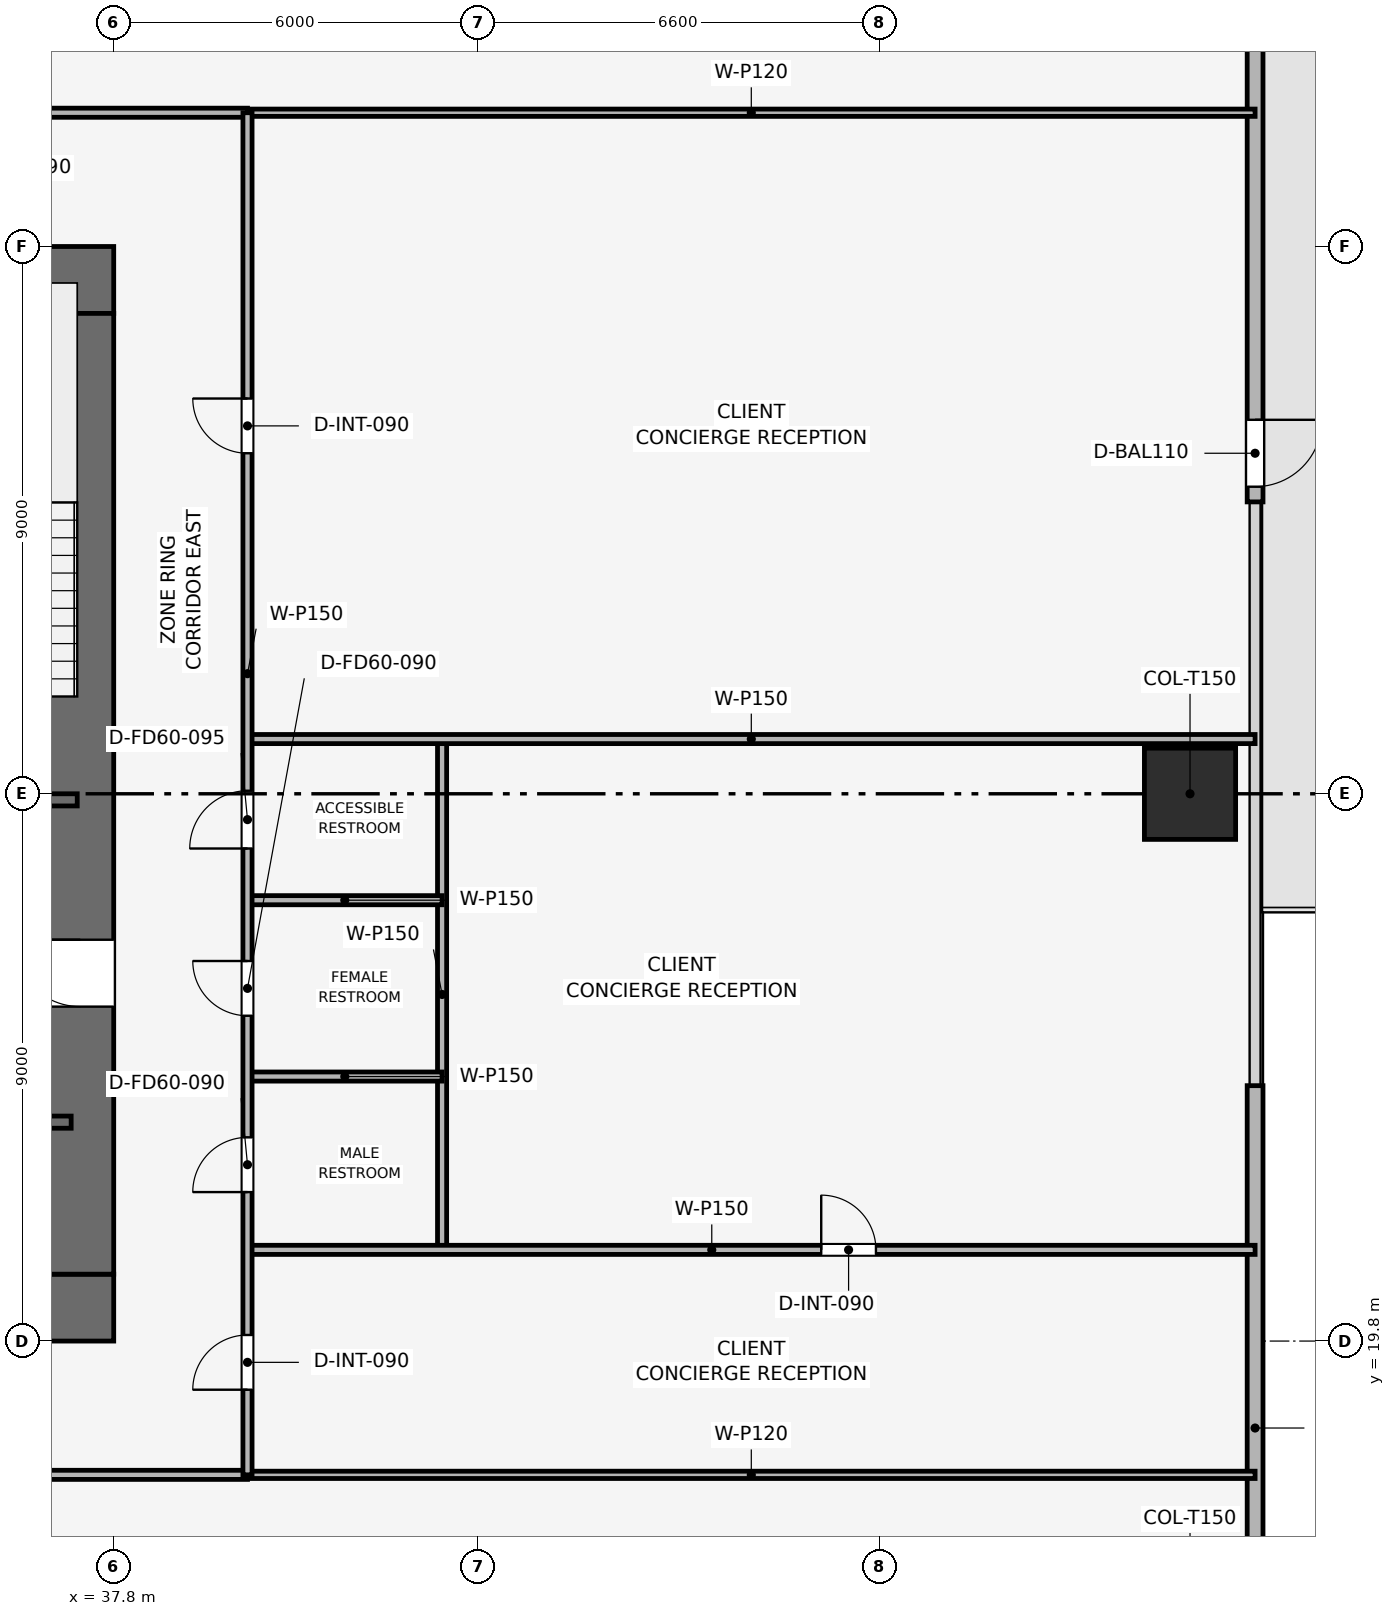
"""IFC4 building model, lengths in metres.
Left out: names, types, materials, properties, quantities, classifications, styles, units other than length and angle.
Written with IfcOpenShell. Run it as: python <this file> out.ifc"""

import sys

from ifc_helpers import new_model, si_unit, direction, frame, frame_2d, origin, origin_2d, place, context, subcontext, project, spatial, rectangle, extrude, element, fill, save


model = new_model("IFC4")
c1 = context("Model", 3, precision=1e-05, world=origin(), true_north=direction((0.0, 1.0)))
c2 = subcontext(c1, "Body", "Model", "MODEL_VIEW")
j1 = project(units=[si_unit("LENGTHUNIT", "METRE"), si_unit("PLANEANGLEUNIT", "RADIAN")], contexts=[c1])
p1 = place(None, origin())
s1 = spatial("IfcSite", under=j1, at=p1, CompositionType="ELEMENT")
p2 = place(p1, origin())
s2 = spatial("IfcBuilding", under=s1, at=p2, CompositionType="ELEMENT")
p3 = place(p2, frame((0.0, 0.0, 45.6)))
s3 = spatial("IfcBuildingStorey", under=s2, at=p3, CompositionType="ELEMENT", Elevation=45.6)
p4 = place(p3, frame((19.8, 20.35, 0.0), z_axis=(0.0, 0.0, 1.0), x_axis=(1.0, 0.0, 0.0)))
e1 = element("IfcWall", 1, at=p4, inside=s3, PredefinedType="SHEAR", context=c2, shape_type="SweptSolid", body=[
    extrude(rectangle(XDim=18.0, YDim=1.1, at=frame_2d((9.0, 0.0))), origin(), (0.0, 0.0, 1.0), 3.9),
])
p5 = place(p4, frame((8.4, 0.0, 0.0)))
e2 = element("IfcOpeningElement", 2, at=p5, cuts=e1, PredefinedType="OPENING", context=c2, shape_type="SweptSolid", body=[
    extrude(rectangle(XDim=1.2, YDim=2.2, at=frame_2d((0.6, 1.1))), frame((0.0, 0.56, 0.0), z_axis=(0.0, -1.0, 0.0), x_axis=(1.0, 0.0, 0.0)), (0.0, 0.0, 1.0), 1.12),
])
p6 = place(p3, frame((19.8, 37.25, 0.0), z_axis=(0.0, 0.0, 1.0), x_axis=(1.0, 0.0, 0.0)))
e3 = element("IfcWall", 3, at=p6, inside=s3, PredefinedType="SHEAR", context=c2, shape_type="SweptSolid", body=[
    extrude(rectangle(XDim=18.0, YDim=1.1, at=frame_2d((9.0, 0.0))), origin(), (0.0, 0.0, 1.0), 3.9),
])
p7 = place(p6, frame((7.05, 0.0, 0.0)))
e4 = element("IfcOpeningElement", 4, at=p7, cuts=e3, PredefinedType="OPENING", context=c2, shape_type="SweptSolid", body=[
    extrude(rectangle(XDim=1.1, YDim=2.15, at=frame_2d((0.55, 1.075))), frame((0.0, 0.56, 0.0), z_axis=(0.0, -1.0, 0.0), x_axis=(1.0, 0.0, 0.0)), (0.0, 0.0, 1.0), 1.12),
])
p8 = place(p3, frame((37.25, 20.9, 0.0), z_axis=(0.0, 0.0, 1.0), x_axis=(0.0, 1.0, 0.0)))
e5 = element("IfcWall", 5, at=p8, inside=s3, PredefinedType="SHEAR", context=c2, shape_type="SweptSolid", body=[
    extrude(rectangle(XDim=15.8, YDim=1.1, at=frame_2d((7.9, 0.0))), origin(), (0.0, 0.0, 1.0), 3.9),
])
p9 = place(p8, frame((4.4, 0.0, 0.0)))
e6 = element("IfcOpeningElement", 6, at=p9, cuts=e5, PredefinedType="OPENING", context=c2, shape_type="SweptSolid", body=[
    extrude(rectangle(XDim=1.1, YDim=2.15, at=frame_2d((0.55, 1.075))), frame((0.0, 0.56, 0.0), z_axis=(0.0, -1.0, 0.0), x_axis=(1.0, 0.0, 0.0)), (0.0, 0.0, 1.0), 1.12),
])
p10 = place(p3, frame((55.5, 28.8, 0.003), z_axis=(0.0, 0.0, 1.0), x_axis=(1.0, 0.0, 0.0)))
e7 = element("IfcColumn", 7, at=p10, inside=s3, PredefinedType="COLUMN", context=c2, shape_type="SweptSolid", body=[
    extrude(rectangle(XDim=1.5, YDim=1.5, at=origin_2d()), origin(), (0.0, 0.0, 1.0), 3.644),
])
p11 = place(p3, frame((56.57, 48.9, 0.0), z_axis=(0.0, 0.0, 1.0), x_axis=(0.0, -1.0, 0.0)))
e8 = element("IfcWall", 8, at=p11, inside=s3, PredefinedType="SOLIDWALL", context=c2, shape_type="SweptSolid", body=[
    extrude(rectangle(XDim=15.3, YDim=0.26, at=frame_2d((7.65, 0.0))), origin(), (0.0, 0.0, 1.0), 3.65),
])
p12 = place(p11, frame((13.95, 0.0, 0.0)))
e9 = element("IfcOpeningElement", 9, at=p12, cuts=e8, PredefinedType="OPENING", context=c2, shape_type="SweptSolid", body=[
    extrude(rectangle(XDim=1.1, YDim=2.2, at=frame_2d((0.55, 1.1))), frame((0.0, 0.14, 0.0), z_axis=(0.0, -1.0, 0.0), x_axis=(1.0, 0.0, 0.0)), (0.0, 0.0, 1.0), 0.28),
])
p13 = place(p3, frame((56.57, 24.0, 0.0), z_axis=(0.0, 0.0, 1.0), x_axis=(0.0, -1.0, 0.0)))
e10 = element("IfcWall", 10, at=p13, inside=s3, PredefinedType="SOLIDWALL", context=c2, shape_type="SweptSolid", body=[
    extrude(rectangle(XDim=15.3, YDim=0.26, at=frame_2d((7.65, 0.0))), origin(), (0.0, 0.0, 1.0), 3.65),
])
p14 = place(p13, frame((11.25, 0.0, 0.9)))
e11 = element("IfcOpeningElement", 11, at=p14, cuts=e10, PredefinedType="OPENING", context=c2, shape_type="SweptSolid", body=[
    extrude(rectangle(XDim=3.8, YDim=1.9, at=frame_2d((1.9, 0.95))), frame((0.0, 0.14, 0.0), z_axis=(0.0, -1.0, 0.0), x_axis=(1.0, 0.0, 0.0)), (0.0, 0.0, 1.0), 0.28),
])
p15 = place(p3, frame((34.05, 28.7, 0.0), z_axis=(0.0, 0.0, 1.0), x_axis=(1.0, 0.0, 0.0)))
e12 = element("IfcWall", 12, at=p15, inside=s3, PredefinedType="SHEAR", context=c2, shape_type="SweptSolid", body=[
    extrude(rectangle(XDim=3.15, YDim=0.2, at=frame_2d((1.575, 0.0))), origin(), (0.0, 0.0, 1.0), 3.65),
])
p16 = place(p15, frame((0.8, 0.0, 0.0)))
e13 = element("IfcOpeningElement", 13, at=p16, cuts=e12, PredefinedType="OPENING", context=c2, shape_type="SweptSolid", body=[
    extrude(rectangle(XDim=1.0, YDim=2.1, at=frame_2d((0.5, 1.05))), frame((0.0, 0.11, 0.0), z_axis=(0.0, -1.0, 0.0), x_axis=(1.0, 0.0, 0.0)), (0.0, 0.0, 1.0), 0.22),
])
p17 = place(p3, frame((34.05, 23.4, 0.0), z_axis=(0.0, 0.0, 1.0), x_axis=(1.0, 0.0, 0.0)))
e14 = element("IfcWall", 14, at=p17, inside=s3, PredefinedType="SHEAR", context=c2, shape_type="SweptSolid", body=[
    extrude(rectangle(XDim=3.05, YDim=0.2, at=frame_2d((1.525, 0.0))), origin(), (0.0, 0.0, 1.0), 3.65),
])
p18 = place(p17, frame((1.2, 0.0, 0.0)))
e15 = element("IfcOpeningElement", 15, at=p18, cuts=e14, PredefinedType="OPENING", context=c2, shape_type="SweptSolid", body=[
    extrude(rectangle(XDim=1.1, YDim=2.15, at=frame_2d((0.55, 1.075))), frame((0.0, 0.11, 0.0), z_axis=(0.0, -1.0, 0.0), x_axis=(1.0, 0.0, 0.0)), (0.0, 0.0, 1.0), 0.22),
])
for number, where, z_axis, x_axis in (
    (16, (40.0, 17.6, 0.0), (0.0, 0.0, 1.0), (1.0, 0.0, 0.0)),
    (17, (40.0, 40.0, 0.0), (0.0, 0.0, 1.0), (1.0, 0.0, 0.0)),
):
    element("IfcWall", number, at=place(p3, frame(where, z_axis=z_axis, x_axis=x_axis)), inside=s3, PredefinedType="PARTITIONING", context=c2, shape_type="SweptSolid", body=[
        extrude(rectangle(XDim=16.57, YDim=0.12, at=frame_2d((8.285, 0.0))), origin(), (0.0, 0.0, 1.0), 2.935),
    ])
p19 = place(p3, frame((43.2, 21.3, 0.0), z_axis=(0.0, 0.0, 1.0), x_axis=(0.0, 1.0, 0.0)))
e18 = element("IfcWall", 18, at=p19, inside=s3, PredefinedType="PARTITIONING", context=c2, shape_type="SweptSolid", body=[
    extrude(rectangle(XDim=8.4, YDim=0.15, at=frame_2d((4.2, 0.0))), origin(), (0.0, 0.0, 1.0), 3.085),
])
p20 = place(p3, frame((40.0, 21.3, 0.0), z_axis=(0.0, 0.0, 1.0), x_axis=(1.0, 0.0, 0.0)))
e19 = element("IfcWall", 19, at=p20, inside=s3, PredefinedType="PARTITIONING", context=c2, shape_type="SweptSolid", body=[
    extrude(rectangle(XDim=16.57, YDim=0.15, at=frame_2d((8.285, 0.0))), origin(), (0.0, 0.0, 1.0), 2.935),
])
p21 = place(p20, frame((9.435, 0.0, 0.0)))
e20 = element("IfcOpeningElement", 20, at=p21, cuts=e19, PredefinedType="OPENING", context=c2, shape_type="SweptSolid", body=[
    extrude(rectangle(XDim=0.9, YDim=2.1, at=frame_2d((0.45, 1.05))), frame((0.0, 0.085, 0.0), z_axis=(0.0, -1.0, 0.0), x_axis=(1.0, 0.0, 0.0)), (0.0, 0.0, 1.0), 0.17),
])
p22 = place(p3, frame((40.0, 29.7, 0.0), z_axis=(0.0, 0.0, 1.0), x_axis=(1.0, 0.0, 0.0)))
e21 = element("IfcWall", 21, at=p22, inside=s3, PredefinedType="PARTITIONING", context=c2, shape_type="SweptSolid", body=[
    extrude(rectangle(XDim=16.57, YDim=0.15, at=frame_2d((8.285, 0.0))), origin(), (0.0, 0.0, 1.0), 2.935),
])
for number, where, z_axis, x_axis in (
    (22, (40.0, 24.15, 0.0), (0.0, 0.0, 1.0), (1.0, 0.0, 0.0)),
    (23, (40.0, 27.05, 0.0), (0.0, 0.0, 1.0), (1.0, 0.0, 0.0)),
):
    element("IfcWall", number, at=place(p3, frame(where, z_axis=z_axis, x_axis=x_axis)), inside=s3, PredefinedType="PARTITIONING", context=c2, shape_type="SweptSolid", body=[
        extrude(rectangle(XDim=3.2, YDim=0.15, at=frame_2d((1.6, 0.0))), origin(), (0.0, 0.0, 1.0), 3.65),
    ])
p23 = place(p3, frame((17.6, 17.6, 0.0), z_axis=(0.0, 0.0, 1.0), x_axis=(1.0, 0.0, 0.0)))
e24 = element("IfcWall", 24, at=p23, inside=s3, PredefinedType="PARTITIONING", context=c2, shape_type="SweptSolid", body=[
    extrude(rectangle(XDim=22.4, YDim=0.15, at=frame_2d((11.2, 0.0))), origin(), (0.0, 0.0, 1.0), 3.085),
])
p24 = place(p23, frame((10.75, 0.0, 0.0)))
e25 = element("IfcOpeningElement", 25, at=p24, cuts=e24, PredefinedType="OPENING", context=c2, shape_type="SweptSolid", body=[
    extrude(rectangle(XDim=0.9, YDim=2.1, at=frame_2d((0.45, 1.05))), frame((0.0, 0.085, 0.0), z_axis=(0.0, -1.0, 0.0), x_axis=(1.0, 0.0, 0.0)), (0.0, 0.0, 1.0), 0.17),
])
p25 = place(p3, frame((17.6, 40.0, 0.0), z_axis=(0.0, 0.0, 1.0), x_axis=(1.0, 0.0, 0.0)))
e26 = element("IfcWall", 26, at=p25, inside=s3, PredefinedType="PARTITIONING", context=c2, shape_type="SweptSolid", body=[
    extrude(rectangle(XDim=22.4, YDim=0.15, at=frame_2d((11.2, 0.0))), origin(), (0.0, 0.0, 1.0), 3.085),
])
p26 = place(p25, frame((0.7, 0.0, 0.0)))
e27 = element("IfcOpeningElement", 27, at=p26, cuts=e26, PredefinedType="OPENING", context=c2, shape_type="SweptSolid", body=[
    extrude(rectangle(XDim=0.9, YDim=2.1, at=frame_2d((0.45, 1.05))), frame((0.0, 0.085, 0.0), z_axis=(0.0, -1.0, 0.0), x_axis=(1.0, 0.0, 0.0)), (0.0, 0.0, 1.0), 0.17),
])
p27 = place(p25, frame((4.706, 0.0, 0.0)))
e28 = element("IfcOpeningElement", 28, at=p27, cuts=e26, PredefinedType="OPENING", context=c2, shape_type="SweptSolid", body=[
    extrude(rectangle(XDim=0.9, YDim=2.1, at=frame_2d((0.45, 1.05))), frame((0.0, 0.085, 0.0), z_axis=(0.0, -1.0, 0.0), x_axis=(1.0, 0.0, 0.0)), (0.0, 0.0, 1.0), 0.17),
])
p28 = place(p25, frame((10.704, 0.0, 0.0)))
e29 = element("IfcOpeningElement", 29, at=p28, cuts=e26, PredefinedType="OPENING", context=c2, shape_type="SweptSolid", body=[
    extrude(rectangle(XDim=0.9, YDim=2.1, at=frame_2d((0.45, 1.05))), frame((0.0, 0.085, 0.0), z_axis=(0.0, -1.0, 0.0), x_axis=(1.0, 0.0, 0.0)), (0.0, 0.0, 1.0), 0.17),
])
p29 = place(p25, frame((17.898, 0.0, 0.0)))
e30 = element("IfcOpeningElement", 30, at=p29, cuts=e26, PredefinedType="OPENING", context=c2, shape_type="SweptSolid", body=[
    extrude(rectangle(XDim=0.9, YDim=2.1, at=frame_2d((0.45, 1.05))), frame((0.0, 0.085, 0.0), z_axis=(0.0, -1.0, 0.0), x_axis=(1.0, 0.0, 0.0)), (0.0, 0.0, 1.0), 0.17),
])
p30 = place(p3, frame((40.0, 17.6, 0.0), z_axis=(0.0, 0.0, 1.0), x_axis=(0.0, 1.0, 0.0)))
e31 = element("IfcWall", 31, at=p30, inside=s3, PredefinedType="PARTITIONING", context=c2, shape_type="SweptSolid", body=[
    extrude(rectangle(XDim=22.4, YDim=0.15, at=frame_2d((11.2, 0.0))), origin(), (0.0, 0.0, 1.0), 3.085),
])
p31 = place(p30, frame((1.4, 0.0, 0.0)))
e32 = element("IfcOpeningElement", 32, at=p31, cuts=e31, PredefinedType="OPENING", context=c2, shape_type="SweptSolid", body=[
    extrude(rectangle(XDim=0.9, YDim=2.1, at=frame_2d((0.45, 1.05))), frame((0.0, 0.085, 0.0), z_axis=(0.0, -1.0, 0.0), x_axis=(1.0, 0.0, 0.0)), (0.0, 0.0, 1.0), 0.17),
])
p32 = place(p30, frame((4.65, 0.0, 0.0)))
e33 = element("IfcOpeningElement", 33, at=p32, cuts=e31, PredefinedType="OPENING", context=c2, shape_type="SweptSolid", body=[
    extrude(rectangle(XDim=0.9, YDim=2.1, at=frame_2d((0.45, 1.05))), frame((0.0, 0.085, 0.0), z_axis=(0.0, -1.0, 0.0), x_axis=(1.0, 0.0, 0.0)), (0.0, 0.0, 1.0), 0.17),
])
p33 = place(p30, frame((7.55, 0.0, 0.0)))
e34 = element("IfcOpeningElement", 34, at=p33, cuts=e31, PredefinedType="OPENING", context=c2, shape_type="SweptSolid", body=[
    extrude(rectangle(XDim=0.9, YDim=2.1, at=frame_2d((0.45, 1.05))), frame((0.0, 0.085, 0.0), z_axis=(0.0, -1.0, 0.0), x_axis=(1.0, 0.0, 0.0)), (0.0, 0.0, 1.0), 0.17),
])
p34 = place(p30, frame((10.3, 0.0, 0.0)))
e35 = element("IfcOpeningElement", 35, at=p34, cuts=e31, PredefinedType="OPENING", context=c2, shape_type="SweptSolid", body=[
    extrude(rectangle(XDim=0.95, YDim=2.1, at=frame_2d((0.475, 1.05))), frame((0.0, 0.085, 0.0), z_axis=(0.0, -1.0, 0.0), x_axis=(1.0, 0.0, 0.0)), (0.0, 0.0, 1.0), 0.17),
])
p35 = place(p30, frame((16.8, 0.0, 0.0)))
e36 = element("IfcOpeningElement", 36, at=p35, cuts=e31, PredefinedType="OPENING", context=c2, shape_type="SweptSolid", body=[
    extrude(rectangle(XDim=0.9, YDim=2.1, at=frame_2d((0.45, 1.05))), frame((0.0, 0.085, 0.0), z_axis=(0.0, -1.0, 0.0), x_axis=(1.0, 0.0, 0.0)), (0.0, 0.0, 1.0), 0.17),
])
p36 = place(p12, origin())
e37 = element("IfcDoor", 37, at=p36, inside=s3, OperationType="SINGLE_SWING_LEFT", PredefinedType="DOOR", context=c2, shape_type="SweptSolid", body=[
    extrude(rectangle(XDim=1.1, YDim=2.2, at=frame_2d((0.55, 1.1))), frame((0.0, 0.025, 0.0), z_axis=(0.0, -1.0, 0.0), x_axis=(1.0, 0.0, 0.0)), (0.0, 0.0, 1.0), 0.05),
])
fill(e9, e37)
p37 = place(p21, origin())
e38 = element("IfcDoor", 38, at=p37, inside=s3, OperationType="SINGLE_SWING_LEFT", PredefinedType="DOOR", context=c2, shape_type="SweptSolid", body=[
    extrude(rectangle(XDim=0.9, YDim=2.1, at=frame_2d((0.45, 1.05))), frame((0.0, 0.025, 0.0), z_axis=(0.0, -1.0, 0.0), x_axis=(1.0, 0.0, 0.0)), (0.0, 0.0, 1.0), 0.05),
])
fill(e20, e38)
p38 = place(p31, origin())
e39 = element("IfcDoor", 39, at=p38, inside=s3, OperationType="SINGLE_SWING_LEFT", PredefinedType="DOOR", context=c2, shape_type="SweptSolid", body=[
    extrude(rectangle(XDim=0.9, YDim=2.1, at=frame_2d((0.45, 1.05))), frame((0.0, 0.025, 0.0), z_axis=(0.0, -1.0, 0.0), x_axis=(1.0, 0.0, 0.0)), (0.0, 0.0, 1.0), 0.05),
])
fill(e32, e39)
p39 = place(p32, origin())
e40 = element("IfcDoor", 40, at=p39, inside=s3, OperationType="SINGLE_SWING_LEFT", PredefinedType="DOOR", context=c2, shape_type="SweptSolid", body=[
    extrude(rectangle(XDim=0.9, YDim=2.1, at=frame_2d((0.45, 1.05))), frame((0.0, 0.025, 0.0), z_axis=(0.0, -1.0, 0.0), x_axis=(1.0, 0.0, 0.0)), (0.0, 0.0, 1.0), 0.05),
])
fill(e33, e40)
p40 = place(p33, origin())
e41 = element("IfcDoor", 41, at=p40, inside=s3, OperationType="SINGLE_SWING_RIGHT", PredefinedType="DOOR", context=c2, shape_type="SweptSolid", body=[
    extrude(rectangle(XDim=0.9, YDim=2.1, at=frame_2d((0.45, 1.05))), frame((0.0, 0.025, 0.0), z_axis=(0.0, -1.0, 0.0), x_axis=(1.0, 0.0, 0.0)), (0.0, 0.0, 1.0), 0.05),
])
fill(e34, e41)
p41 = place(p34, origin())
e42 = element("IfcDoor", 42, at=p41, inside=s3, OperationType="SINGLE_SWING_LEFT", PredefinedType="DOOR", context=c2, shape_type="SweptSolid", body=[
    extrude(rectangle(XDim=0.95, YDim=2.1, at=frame_2d((0.475, 1.05))), frame((0.0, 0.025, 0.0), z_axis=(0.0, -1.0, 0.0), x_axis=(1.0, 0.0, 0.0)), (0.0, 0.0, 1.0), 0.05),
])
fill(e35, e42)
p42 = place(p35, origin())
e43 = element("IfcDoor", 43, at=p42, inside=s3, OperationType="SINGLE_SWING_RIGHT", PredefinedType="DOOR", context=c2, shape_type="SweptSolid", body=[
    extrude(rectangle(XDim=0.9, YDim=2.1, at=frame_2d((0.45, 1.05))), frame((0.0, 0.025, 0.0), z_axis=(0.0, -1.0, 0.0), x_axis=(1.0, 0.0, 0.0)), (0.0, 0.0, 1.0), 0.05),
])
fill(e36, e43)
p43 = place(p9, origin())
e44 = element("IfcDoor", 44, at=p43, inside=s3, OperationType="SINGLE_SWING_RIGHT", PredefinedType="DOOR", context=c2, shape_type="SweptSolid", body=[
    extrude(rectangle(XDim=1.1, YDim=2.15, at=frame_2d((0.55, 1.075))), frame((0.0, 0.025, 0.0), z_axis=(0.0, -1.0, 0.0), x_axis=(1.0, 0.0, 0.0)), (0.0, 0.0, 1.0), 0.05),
])
fill(e6, e44)
save(model, sys.argv[1])
